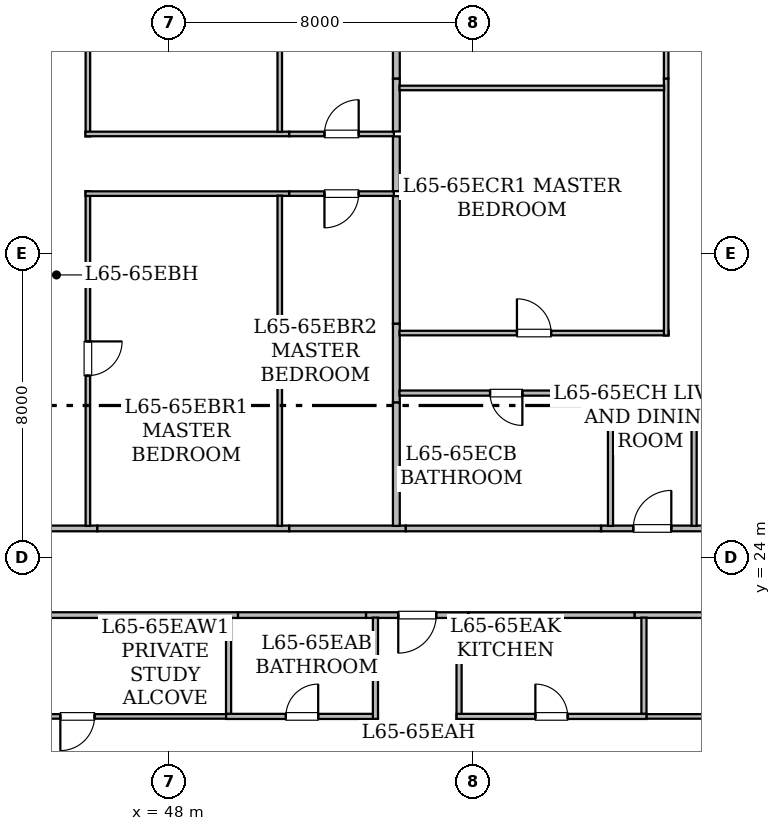
"""IFC4 building model, lengths in metres.
Left out: names, types, materials, properties, quantities, classifications, styles, units other than length and angle.
Written with IfcOpenShell. Run it as: python <this file> out.ifc"""

import sys

from ifc_helpers import new_model, si_unit, direction, frame, frame_2d, origin, place, context, subcontext, project, spatial, rectangle, extrude, element, fill, save


model = new_model("IFC4")
c1 = context("Model", 3, precision=1e-05, world=origin(), true_north=direction((0.0, 1.0)))
c2 = subcontext(c1, "Body", "Model", "MODEL_VIEW")
j1 = project(units=[si_unit("LENGTHUNIT", "METRE"), si_unit("PLANEANGLEUNIT", "RADIAN")], contexts=[c1])
p1 = place(None, origin())
s1 = spatial("IfcSite", under=j1, at=p1, CompositionType="ELEMENT")
p2 = place(p1, origin())
s2 = spatial("IfcBuilding", under=s1, at=p2, CompositionType="ELEMENT")
p3 = place(p2, frame((0.0, 0.0, 253.7)))
s3 = spatial("IfcBuildingStorey", under=s2, at=p3, CompositionType="ELEMENT", Elevation=253.7)
p4 = place(p3, frame((49.819, 22.485, 0.0), z_axis=(0.0, 0.0, 1.0), x_axis=(-1.0, 0.0, 0.0)))
e1 = element("IfcWall", 1, at=p4, inside=s3, PredefinedType="STANDARD", context=c2, shape_type="SweptSolid", body=[
    extrude(rectangle(XDim=8.269, YDim=0.15, at=frame_2d((4.135, 0.0))), origin(), (0.0, 0.0, 1.0), 3.43),
])
p5 = place(p3, frame((69.608, 22.485, 0.0), z_axis=(0.0, 0.0, 1.0), x_axis=(-1.0, 0.0, 0.0)))
e2 = element("IfcWall", 2, at=p5, inside=s3, PredefinedType="STANDARD", context=c2, shape_type="SweptSolid", body=[
    extrude(rectangle(XDim=9.357, YDim=0.15, at=frame_2d((4.678, 0.0))), origin(), (0.0, 0.0, 1.0), 2.887),
])
p6 = place(p3, frame((55.884, 22.485, 0.0), z_axis=(0.0, 0.0, 1.0), x_axis=(-1.0, 0.0, 0.0)))
e3 = element("IfcWall", 3, at=p6, inside=s3, PredefinedType="STANDARD", context=c2, shape_type="SweptSolid", body=[
    extrude(rectangle(XDim=2.698, YDim=0.15, at=frame_2d((1.349, 0.0))), origin(), (0.0, 0.0, 1.0), 2.725),
])
p7 = place(p6, frame((0.849, 0.0, 0.0)))
e4 = element("IfcOpeningElement", 4, at=p7, cuts=e3, PredefinedType="OPENING", context=c2, shape_type="SweptSolid", body=[
    extrude(rectangle(XDim=1.0, YDim=2.15, at=frame_2d((0.5, 1.075))), frame((0.0, 0.085, 0.0), z_axis=(0.0, -1.0, 0.0), x_axis=(1.0, 0.0, 0.0)), (0.0, 0.0, 1.0), 0.17),
])
p8 = place(p3, frame((53.186, 22.485, 0.0), z_axis=(0.0, 0.0, 1.0), x_axis=(-1.0, 0.0, 0.0)))
e5 = element("IfcWall", 5, at=p8, inside=s3, PredefinedType="STANDARD", context=c2, shape_type="SweptSolid", body=[
    extrude(rectangle(XDim=3.367, YDim=0.15, at=frame_2d((1.684, 0.0))), origin(), (0.0, 0.0, 1.0), 2.725),
])
p9 = place(p3, frame((60.251, 22.485, 0.0), z_axis=(0.0, 0.0, 1.0), x_axis=(-1.0, 0.0, 0.0)))
e6 = element("IfcWall", 6, at=p9, inside=s3, PredefinedType="STANDARD", context=c2, shape_type="SweptSolid", body=[
    extrude(rectangle(XDim=4.367, YDim=0.15, at=frame_2d((2.184, 0.0))), origin(), (0.0, 0.0, 1.0), 3.43),
])
p10 = place(p3, frame((44.039, 24.765, 0.0), z_axis=(0.0, 0.0, 1.0), x_axis=(1.0, 0.0, 0.0)))
e7 = element("IfcWall", 7, at=p10, inside=s3, PredefinedType="STANDARD", context=c2, shape_type="SweptSolid", body=[
    extrude(rectangle(XDim=2.078, YDim=0.15, at=frame_2d((1.039, 0.0))), origin(), (0.0, 0.0, 1.0), 3.43),
])
p11 = place(p3, frame((46.117, 24.765, 0.0), z_axis=(0.0, 0.0, 1.0), x_axis=(1.0, 0.0, 0.0)))
e8 = element("IfcWall", 8, at=p11, inside=s3, PredefinedType="STANDARD", context=c2, shape_type="SweptSolid", body=[
    extrude(rectangle(XDim=5.05, YDim=0.15, at=frame_2d((2.525, 0.0))), origin(), (0.0, 0.0, 1.0), 3.43),
])
p12 = place(p3, frame((51.167, 24.765, 0.0), z_axis=(0.0, 0.0, 1.0), x_axis=(1.0, 0.0, 0.0)))
e9 = element("IfcWall", 9, at=p12, inside=s3, PredefinedType="STANDARD", context=c2, shape_type="SweptSolid", body=[
    extrude(rectangle(XDim=3.067, YDim=0.15, at=frame_2d((1.533, 0.0))), origin(), (0.0, 0.0, 1.0), 2.725),
])
p13 = place(p3, frame((59.371, 24.765, 0.0), z_axis=(0.0, 0.0, 1.0), x_axis=(1.0, 0.0, 0.0)))
e10 = element("IfcWall", 10, at=p13, inside=s3, PredefinedType="STANDARD", context=c2, shape_type="SweptSolid", body=[
    extrude(rectangle(XDim=2.698, YDim=0.15, at=frame_2d((1.349, 0.0))), origin(), (0.0, 0.0, 1.0), 3.43),
])
p14 = place(p13, frame((0.849, 0.0, 0.0)))
e11 = element("IfcOpeningElement", 11, at=p14, cuts=e10, PredefinedType="OPENING", context=c2, shape_type="SweptSolid", body=[
    extrude(rectangle(XDim=1.0, YDim=2.15, at=frame_2d((0.5, 1.075))), frame((0.0, 0.085, 0.0), z_axis=(0.0, -1.0, 0.0), x_axis=(1.0, 0.0, 0.0)), (0.0, 0.0, 1.0), 0.17),
])
p15 = place(p3, frame((54.234, 24.765, 0.0), z_axis=(0.0, 0.0, 1.0), x_axis=(1.0, 0.0, 0.0)))
e12 = element("IfcWall", 12, at=p15, inside=s3, PredefinedType="STANDARD", context=c2, shape_type="SweptSolid", body=[
    extrude(rectangle(XDim=5.137, YDim=0.15, at=frame_2d((2.569, 0.0))), origin(), (0.0, 0.0, 1.0), 3.43),
])
p16 = place(p3, frame((49.505, 19.819, 0.0), z_axis=(0.0, 0.0, 1.0), x_axis=(-1.0, 0.0, 0.0)))
e13 = element("IfcWall", 13, at=p16, inside=s3, PredefinedType="PARTITIONING", context=c2, shape_type="SweptSolid", body=[
    extrude(rectangle(XDim=7.823, YDim=0.12, at=frame_2d((3.912, 0.0))), origin(), (0.0, 0.0, 1.0), 3.43),
])
p17 = place(p16, frame((3.462, 0.0, 0.0)))
e14 = element("IfcOpeningElement", 14, at=p17, cuts=e13, PredefinedType="OPENING", context=c2, shape_type="SweptSolid", body=[
    extrude(rectangle(XDim=0.9, YDim=2.1, at=frame_2d((0.45, 1.05))), frame((0.0, 0.07, 0.0), z_axis=(0.0, -1.0, 0.0), x_axis=(1.0, 0.0, 0.0)), (0.0, 0.0, 1.0), 0.14),
])
p18 = place(p3, frame((49.57, 22.418, 0.0), z_axis=(0.0, 0.0, 1.0), x_axis=(0.0, -1.0, 0.0)))
e15 = element("IfcWall", 15, at=p18, inside=s3, PredefinedType="PARTITIONING", context=c2, shape_type="SweptSolid", body=[
    extrude(rectangle(XDim=2.534, YDim=0.135, at=frame_2d((1.267, 0.0))), origin(), (0.0, 0.0, 1.0), 3.43),
])
p19 = place(p3, frame((69.608, 19.819, 0.0), z_axis=(0.0, 0.0, 1.0), x_axis=(-1.0, 0.0, 0.0)))
e16 = element("IfcWall", 16, at=p19, inside=s3, PredefinedType="PARTITIONING", context=c2, shape_type="SweptSolid", body=[
    extrude(rectangle(XDim=9.043, YDim=0.12, at=frame_2d((4.521, 0.0))), origin(), (0.0, 0.0, 1.0), 2.725),
])
p20 = place(p19, frame((4.071, 0.0, 0.0)))
e17 = element("IfcOpeningElement", 17, at=p20, cuts=e16, PredefinedType="OPENING", context=c2, shape_type="SweptSolid", body=[
    extrude(rectangle(XDim=0.9, YDim=2.1, at=frame_2d((0.45, 1.05))), frame((0.0, 0.07, 0.0), z_axis=(0.0, -1.0, 0.0), x_axis=(1.0, 0.0, 0.0)), (0.0, 0.0, 1.0), 0.14),
])
p21 = place(p3, frame((60.5, 19.884, 0.0), z_axis=(0.0, 0.0, 1.0), x_axis=(0.0, 1.0, 0.0)))
e18 = element("IfcWall", 18, at=p21, inside=s3, PredefinedType="PARTITIONING", context=c2, shape_type="SweptSolid", body=[
    extrude(rectangle(XDim=2.534, YDim=0.135, at=frame_2d((1.267, 0.0))), origin(), (0.0, 0.0, 1.0), 3.43),
])
p22 = place(p3, frame((49.505, 19.819, 0.0), z_axis=(0.0, 0.0, 1.0), x_axis=(1.0, 0.0, 0.0)))
e19 = element("IfcWall", 19, at=p22, inside=s3, PredefinedType="PARTITIONING", context=c2, shape_type="SweptSolid", body=[
    extrude(rectangle(XDim=3.995, YDim=0.135, at=frame_2d((1.998, 0.0))), origin(), (0.0, 0.0, 1.0), 2.725),
])
p23 = place(p22, frame((1.573, 0.0, 0.0)))
e20 = element("IfcOpeningElement", 20, at=p23, cuts=e19, PredefinedType="OPENING", context=c2, shape_type="SweptSolid", body=[
    extrude(rectangle(XDim=0.85, YDim=2.1, at=frame_2d((0.425, 1.05))), frame((0.0, 0.077, 0.0), z_axis=(0.0, -1.0, 0.0), x_axis=(1.0, 0.0, 0.0)), (0.0, 0.0, 1.0), 0.155),
])
p24 = place(p3, frame((53.435, 19.754, 0.0), z_axis=(0.0, 0.0, 1.0), x_axis=(0.0, 1.0, 0.0)))
e21 = element("IfcWall", 21, at=p24, inside=s3, PredefinedType="PARTITIONING", context=c2, shape_type="SweptSolid", body=[
    extrude(rectangle(XDim=2.664, YDim=0.135, at=frame_2d((1.332, 0.0))), origin(), (0.0, 0.0, 1.0), 2.725),
])
p25 = place(p3, frame((55.635, 22.418, 0.0), z_axis=(0.0, 0.0, 1.0), x_axis=(0.0, -1.0, 0.0)))
e22 = element("IfcWall", 22, at=p25, inside=s3, PredefinedType="PARTITIONING", context=c2, shape_type="SweptSolid", body=[
    extrude(rectangle(XDim=2.664, YDim=0.135, at=frame_2d((1.332, 0.0))), origin(), (0.0, 0.0, 1.0), 3.43),
])
p26 = place(p3, frame((55.57, 19.819, 0.0), z_axis=(0.0, 0.0, 1.0), x_axis=(1.0, 0.0, 0.0)))
e23 = element("IfcWall", 23, at=p26, inside=s3, PredefinedType="PARTITIONING", context=c2, shape_type="SweptSolid", body=[
    extrude(rectangle(XDim=4.995, YDim=0.135, at=frame_2d((2.498, 0.0))), origin(), (0.0, 0.0, 1.0), 2.725),
])
p27 = place(p26, frame((2.073, 0.0, 0.0)))
e24 = element("IfcOpeningElement", 24, at=p27, cuts=e23, PredefinedType="OPENING", context=c2, shape_type="SweptSolid", body=[
    extrude(rectangle(XDim=0.85, YDim=2.1, at=frame_2d((0.425, 1.05))), frame((0.0, 0.077, 0.0), z_axis=(0.0, -1.0, 0.0), x_axis=(1.0, 0.0, 0.0)), (0.0, 0.0, 1.0), 0.155),
])
p28 = place(p3, frame((45.868, 33.64, 0.0), z_axis=(0.0, 0.0, 1.0), x_axis=(0.0, -1.0, 0.0)))
e25 = element("IfcWall", 25, at=p28, inside=s3, PredefinedType="PARTITIONING", context=c2, shape_type="SweptSolid", body=[
    extrude(rectangle(XDim=8.808, YDim=0.12, at=frame_2d((4.404, 0.0))), origin(), (0.0, 0.0, 1.0), 3.013),
])
p29 = place(p28, frame((3.954, 0.0, 0.0)))
e26 = element("IfcOpeningElement", 26, at=p29, cuts=e25, PredefinedType="OPENING", context=c2, shape_type="SweptSolid", body=[
    extrude(rectangle(XDim=0.9, YDim=2.1, at=frame_2d((0.45, 1.05))), frame((0.0, 0.07, 0.0), z_axis=(0.0, -1.0, 0.0), x_axis=(1.0, 0.0, 0.0)), (0.0, 0.0, 1.0), 0.14),
])
p30 = place(p3, frame((51.167, 33.575, 0.0), z_axis=(0.0, 0.0, 1.0), x_axis=(-1.0, 0.0, 0.0)))
e27 = element("IfcWall", 27, at=p30, inside=s3, PredefinedType="PARTITIONING", context=c2, shape_type="SweptSolid", body=[
    extrude(rectangle(XDim=5.364, YDim=0.12, at=frame_2d((2.682, 0.0))), origin(), (0.0, 0.0, 1.0), 3.013),
])
p31 = place(p3, frame((53.92, 33.575, 0.0), z_axis=(0.0, 0.0, 1.0), x_axis=(-1.0, 0.0, 0.0)))
e28 = element("IfcWall", 28, at=p31, inside=s3, PredefinedType="PARTITIONING", context=c2, shape_type="SweptSolid", body=[
    extrude(rectangle(XDim=2.753, YDim=0.12, at=frame_2d((1.376, 0.0))), origin(), (0.0, 0.0, 1.0), 2.725),
])
p32 = place(p31, frame((0.927, 0.0, 0.0)))
e29 = element("IfcOpeningElement", 29, at=p32, cuts=e28, PredefinedType="OPENING", context=c2, shape_type="SweptSolid", body=[
    extrude(rectangle(XDim=0.9, YDim=2.1, at=frame_2d((0.45, 1.05))), frame((0.0, 0.07, 0.0), z_axis=(0.0, -1.0, 0.0), x_axis=(1.0, 0.0, 0.0)), (0.0, 0.0, 1.0), 0.14),
])
p33 = place(p3, frame((45.868, 43.808, 0.0), z_axis=(0.0, 0.0, 1.0), x_axis=(0.0, -1.0, 0.0)))
e30 = element("IfcWall", 30, at=p33, inside=s3, PredefinedType="PARTITIONING", context=c2, shape_type="SweptSolid", body=[
    extrude(rectangle(XDim=8.728, YDim=0.12, at=frame_2d((4.364, 0.0))), origin(), (0.0, 0.0, 1.0), 2.725),
])
p34 = place(p33, frame((3.914, 0.0, 0.0)))
e31 = element("IfcOpeningElement", 31, at=p34, cuts=e30, PredefinedType="OPENING", context=c2, shape_type="SweptSolid", body=[
    extrude(rectangle(XDim=0.9, YDim=2.1, at=frame_2d((0.45, 1.05))), frame((0.0, 0.07, 0.0), z_axis=(0.0, -1.0, 0.0), x_axis=(1.0, 0.0, 0.0)), (0.0, 0.0, 1.0), 0.14),
])
p35 = place(p3, frame((45.803, 35.145, 0.0), z_axis=(0.0, 0.0, 1.0), x_axis=(1.0, 0.0, 0.0)))
e32 = element("IfcWall", 32, at=p35, inside=s3, PredefinedType="PARTITIONING", context=c2, shape_type="SweptSolid", body=[
    extrude(rectangle(XDim=5.364, YDim=0.12, at=frame_2d((2.682, 0.0))), origin(), (0.0, 0.0, 1.0), 3.43),
])
p36 = place(p3, frame((51.167, 35.145, 0.0), z_axis=(0.0, 0.0, 1.0), x_axis=(1.0, 0.0, 0.0)))
e33 = element("IfcWall", 33, at=p36, inside=s3, PredefinedType="PARTITIONING", context=c2, shape_type="SweptSolid", body=[
    extrude(rectangle(XDim=2.753, YDim=0.12, at=frame_2d((1.376, 0.0))), origin(), (0.0, 0.0, 1.0), 2.725),
])
p37 = place(p36, frame((0.927, 0.0, 0.0)))
e34 = element("IfcOpeningElement", 34, at=p37, cuts=e33, PredefinedType="OPENING", context=c2, shape_type="SweptSolid", body=[
    extrude(rectangle(XDim=0.9, YDim=2.1, at=frame_2d((0.45, 1.05))), frame((0.0, 0.07, 0.0), z_axis=(0.0, -1.0, 0.0), x_axis=(1.0, 0.0, 0.0)), (0.0, 0.0, 1.0), 0.14),
])
p38 = place(p3, frame((53.985, 35.08, 0.0), z_axis=(0.0, 0.0, 1.0), x_axis=(0.0, -1.0, 0.0)))
e35 = element("IfcWall", 35, at=p38, inside=s3, PredefinedType="STANDARD", context=c2, shape_type="SweptSolid", body=[
    extrude(rectangle(XDim=1.44, YDim=0.18, at=frame_2d((0.72, 0.0))), origin(), (0.0, 0.0, 1.0), 3.43),
])
p39 = place(p3, frame((50.917, 33.521, 0.0), z_axis=(0.0, 0.0, 1.0), x_axis=(0.0, -1.0, 0.0)))
e36 = element("IfcWall", 36, at=p39, inside=s3, PredefinedType="PARTITIONING", context=c2, shape_type="SweptSolid", body=[
    extrude(rectangle(XDim=8.689, YDim=0.12, at=frame_2d((4.344, 0.0))), origin(), (0.0, 0.0, 1.0), 3.013),
])
p40 = place(p3, frame((53.985, 30.155, 0.0), z_axis=(0.0, 0.0, 1.0), x_axis=(0.0, -1.0, 0.0)))
e37 = element("IfcWall", 37, at=p40, inside=s3, PredefinedType="STANDARD", context=c2, shape_type="SweptSolid", body=[
    extrude(rectangle(XDim=2.078, YDim=0.18, at=frame_2d((1.039, 0.0))), origin(), (0.0, 0.0, 1.0), 3.43),
])
p41 = place(p3, frame((53.985, 28.077, 0.0), z_axis=(0.0, 0.0, 1.0), x_axis=(0.0, -1.0, 0.0)))
e38 = element("IfcWall", 38, at=p41, inside=s3, PredefinedType="STANDARD", context=c2, shape_type="SweptSolid", body=[
    extrude(rectangle(XDim=3.245, YDim=0.18, at=frame_2d((1.623, 0.0))), origin(), (0.0, 0.0, 1.0), 3.43),
])
p42 = place(p3, frame((53.985, 33.51, 0.0), z_axis=(0.0, 0.0, 1.0), x_axis=(0.0, -1.0, 0.0)))
e39 = element("IfcWall", 39, at=p42, inside=s3, PredefinedType="STANDARD", context=c2, shape_type="SweptSolid", body=[
    extrude(rectangle(XDim=3.355, YDim=0.18, at=frame_2d((1.677, 0.0))), origin(), (0.0, 0.0, 1.0), 3.013),
])
p43 = place(p3, frame((50.917, 43.808, 0.0), z_axis=(0.0, 0.0, 1.0), x_axis=(0.0, -1.0, 0.0)))
e40 = element("IfcWall", 40, at=p43, inside=s3, PredefinedType="PARTITIONING", context=c2, shape_type="SweptSolid", body=[
    extrude(rectangle(XDim=8.609, YDim=0.12, at=frame_2d((4.305, 0.0))), origin(), (0.0, 0.0, 1.0), 2.725),
])
p44 = place(p3, frame((53.985, 36.604, 0.0), z_axis=(0.0, 0.0, 1.0), x_axis=(0.0, -1.0, 0.0)))
e41 = element("IfcWall", 41, at=p44, inside=s3, PredefinedType="STANDARD", context=c2, shape_type="SweptSolid", body=[
    extrude(rectangle(XDim=1.394, YDim=0.18, at=frame_2d((0.697, 0.0))), origin(), (0.0, 0.0, 1.0), 3.43),
])
p45 = place(p3, frame((53.985, 43.808, 0.0), z_axis=(0.0, 0.0, 1.0), x_axis=(0.0, -1.0, 0.0)))
e42 = element("IfcWall", 42, at=p45, inside=s3, PredefinedType="STANDARD", context=c2, shape_type="SweptSolid", body=[
    extrude(rectangle(XDim=7.204, YDim=0.18, at=frame_2d((3.602, 0.0))), origin(), (0.0, 0.0, 1.0), 2.725),
])
p46 = place(p3, frame((59.62, 24.832, 0.0), z_axis=(0.0, 0.0, 1.0), x_axis=(0.0, 1.0, 0.0)))
e43 = element("IfcWall", 43, at=p46, inside=s3, PredefinedType="PARTITIONING", context=c2, shape_type="SweptSolid", body=[
    extrude(rectangle(XDim=3.559, YDim=0.135, at=frame_2d((1.78, 0.0))), origin(), (0.0, 0.0, 1.0), 3.43),
])
p47 = place(p3, frame((59.685, 28.326, 0.0), z_axis=(0.0, 0.0, 1.0), x_axis=(-1.0, 0.0, 0.0)))
e44 = element("IfcWall", 44, at=p47, inside=s3, PredefinedType="PARTITIONING", context=c2, shape_type="SweptSolid", body=[
    extrude(rectangle(XDim=5.618, YDim=0.135, at=frame_2d((2.809, 0.0))), origin(), (0.0, 0.0, 1.0), 3.43),
])
p48 = place(p47, frame((2.384, 0.0, 0.0)))
e45 = element("IfcOpeningElement", 45, at=p48, cuts=e44, PredefinedType="OPENING", context=c2, shape_type="SweptSolid", body=[
    extrude(rectangle(XDim=0.85, YDim=2.1, at=frame_2d((0.425, 1.05))), frame((0.0, 0.077, 0.0), z_axis=(0.0, -1.0, 0.0), x_axis=(1.0, 0.0, 0.0)), (0.0, 0.0, 1.0), 0.155),
])
p49 = place(p3, frame((67.686, 28.326, 0.0), z_axis=(0.0, 0.0, 1.0), x_axis=(-1.0, 0.0, 0.0)))
e46 = element("IfcWall", 46, at=p49, inside=s3, PredefinedType="PARTITIONING", context=c2, shape_type="SweptSolid", body=[
    extrude(rectangle(XDim=5.931, YDim=0.135, at=frame_2d((2.966, 0.0))), origin(), (0.0, 0.0, 1.0), 2.887),
])
p50 = place(p49, frame((2.541, 0.0, 0.0)))
e47 = element("IfcOpeningElement", 47, at=p50, cuts=e46, PredefinedType="OPENING", context=c2, shape_type="SweptSolid", body=[
    extrude(rectangle(XDim=0.85, YDim=2.1, at=frame_2d((0.425, 1.05))), frame((0.0, 0.077, 0.0), z_axis=(0.0, -1.0, 0.0), x_axis=(1.0, 0.0, 0.0)), (0.0, 0.0, 1.0), 0.155),
])
p51 = place(p3, frame((61.82, 28.391, 0.0), z_axis=(0.0, 0.0, 1.0), x_axis=(0.0, -1.0, 0.0)))
e48 = element("IfcWall", 48, at=p51, inside=s3, PredefinedType="PARTITIONING", context=c2, shape_type="SweptSolid", body=[
    extrude(rectangle(XDim=3.559, YDim=0.135, at=frame_2d((1.78, 0.0))), origin(), (0.0, 0.0, 1.0), 3.43),
])
p52 = place(p3, frame((54.067, 29.906, 0.0), z_axis=(0.0, 0.0, 1.0), x_axis=(1.0, 0.0, 0.0)))
e49 = element("IfcWall", 49, at=p52, inside=s3, PredefinedType="PARTITIONING", context=c2, shape_type="SweptSolid", body=[
    extrude(rectangle(XDim=7.083, YDim=0.12, at=frame_2d((3.542, 0.0))), origin(), (0.0, 0.0, 1.0), 3.43),
])
p53 = place(p52, frame((3.091, 0.0, 0.0)))
e50 = element("IfcOpeningElement", 50, at=p53, cuts=e49, PredefinedType="OPENING", context=c2, shape_type="SweptSolid", body=[
    extrude(rectangle(XDim=0.9, YDim=2.1, at=frame_2d((0.45, 1.05))), frame((0.0, 0.07, 0.0), z_axis=(0.0, -1.0, 0.0), x_axis=(1.0, 0.0, 0.0)), (0.0, 0.0, 1.0), 0.14),
])
p54 = place(p3, frame((61.085, 29.841, 0.0), z_axis=(0.0, 0.0, 1.0), x_axis=(0.0, 1.0, 0.0)))
e51 = element("IfcWall", 51, at=p54, inside=s3, PredefinedType="PARTITIONING", context=c2, shape_type="SweptSolid", body=[
    extrude(rectangle(XDim=6.763, YDim=0.12, at=frame_2d((3.381, 0.0))), origin(), (0.0, 0.0, 1.0), 2.725),
])
p55 = place(p3, frame((61.085, 36.604, 0.0), z_axis=(0.0, 0.0, 1.0), x_axis=(0.0, 1.0, 0.0)))
e52 = element("IfcWall", 52, at=p55, inside=s3, PredefinedType="PARTITIONING", context=c2, shape_type="SweptSolid", body=[
    extrude(rectangle(XDim=7.204, YDim=0.12, at=frame_2d((3.602, 0.0))), origin(), (0.0, 0.0, 1.0), 2.725),
])
p56 = place(p55, frame((3.152, 0.0, 0.0)))
e53 = element("IfcOpeningElement", 53, at=p56, cuts=e52, PredefinedType="OPENING", context=c2, shape_type="SweptSolid", body=[
    extrude(rectangle(XDim=0.9, YDim=2.1, at=frame_2d((0.45, 1.05))), frame((0.0, 0.07, 0.0), z_axis=(0.0, -1.0, 0.0), x_axis=(1.0, 0.0, 0.0)), (0.0, 0.0, 1.0), 0.14),
])
p57 = place(p3, frame((54.067, 36.355, 0.0), z_axis=(0.0, 0.0, 1.0), x_axis=(1.0, 0.0, 0.0)))
e54 = element("IfcWall", 54, at=p57, inside=s3, PredefinedType="PARTITIONING", context=c2, shape_type="SweptSolid", body=[
    extrude(rectangle(XDim=6.964, YDim=0.12, at=frame_2d((3.482, 0.0))), origin(), (0.0, 0.0, 1.0), 2.725),
])
p58 = place(p7, origin())
e55 = element("IfcDoor", 55, at=p58, inside=s3, OperationType="SINGLE_SWING_RIGHT", PredefinedType="DOOR", context=c2, shape_type="SweptSolid", body=[
    extrude(rectangle(XDim=1.0, YDim=2.15, at=frame_2d((0.5, 1.075))), frame((0.0, 0.025, 0.0), z_axis=(0.0, -1.0, 0.0), x_axis=(1.0, 0.0, 0.0)), (0.0, 0.0, 1.0), 0.05),
])
fill(e4, e55)
p59 = place(p14, origin())
e56 = element("IfcDoor", 56, at=p59, inside=s3, OperationType="SINGLE_SWING_RIGHT", PredefinedType="DOOR", context=c2, shape_type="SweptSolid", body=[
    extrude(rectangle(XDim=1.0, YDim=2.15, at=frame_2d((0.5, 1.075))), frame((0.0, 0.025, 0.0), z_axis=(0.0, -1.0, 0.0), x_axis=(1.0, 0.0, 0.0)), (0.0, 0.0, 1.0), 0.05),
])
fill(e11, e56)
p60 = place(p17, origin())
e57 = element("IfcDoor", 57, at=p60, inside=s3, OperationType="SINGLE_SWING_RIGHT", PredefinedType="DOOR", context=c2, shape_type="SweptSolid", body=[
    extrude(rectangle(XDim=0.9, YDim=2.1, at=frame_2d((0.45, 1.05))), frame((0.0, 0.025, 0.0), z_axis=(0.0, -1.0, 0.0), x_axis=(1.0, 0.0, 0.0)), (0.0, 0.0, 1.0), 0.05),
])
fill(e14, e57)
p61 = place(p23, origin())
e58 = element("IfcDoor", 58, at=p61, inside=s3, OperationType="SINGLE_SWING_RIGHT", PredefinedType="DOOR", context=c2, shape_type="SweptSolid", body=[
    extrude(rectangle(XDim=0.85, YDim=2.1, at=frame_2d((0.425, 1.05))), frame((0.0, 0.025, 0.0), z_axis=(0.0, -1.0, 0.0), x_axis=(1.0, 0.0, 0.0)), (0.0, 0.0, 1.0), 0.05),
])
fill(e20, e58)
p62 = place(p27, origin())
e59 = element("IfcDoor", 59, at=p62, inside=s3, OperationType="SINGLE_SWING_LEFT", PredefinedType="DOOR", context=c2, shape_type="SweptSolid", body=[
    extrude(rectangle(XDim=0.85, YDim=2.1, at=frame_2d((0.425, 1.05))), frame((0.0, 0.025, 0.0), z_axis=(0.0, -1.0, 0.0), x_axis=(1.0, 0.0, 0.0)), (0.0, 0.0, 1.0), 0.05),
])
fill(e24, e59)
p63 = place(p29, origin())
e60 = element("IfcDoor", 60, at=p63, inside=s3, OperationType="SINGLE_SWING_LEFT", PredefinedType="DOOR", context=c2, shape_type="SweptSolid", body=[
    extrude(rectangle(XDim=0.9, YDim=2.1, at=frame_2d((0.45, 1.05))), frame((0.0, 0.025, 0.0), z_axis=(0.0, -1.0, 0.0), x_axis=(1.0, 0.0, 0.0)), (0.0, 0.0, 1.0), 0.05),
])
fill(e26, e60)
p64 = place(p32, origin())
e61 = element("IfcDoor", 61, at=p64, inside=s3, OperationType="SINGLE_SWING_RIGHT", PredefinedType="DOOR", context=c2, shape_type="SweptSolid", body=[
    extrude(rectangle(XDim=0.9, YDim=2.1, at=frame_2d((0.45, 1.05))), frame((0.0, 0.025, 0.0), z_axis=(0.0, -1.0, 0.0), x_axis=(1.0, 0.0, 0.0)), (0.0, 0.0, 1.0), 0.05),
])
fill(e29, e61)
p65 = place(p37, origin())
e62 = element("IfcDoor", 62, at=p65, inside=s3, OperationType="SINGLE_SWING_RIGHT", PredefinedType="DOOR", context=c2, shape_type="SweptSolid", body=[
    extrude(rectangle(XDim=0.9, YDim=2.1, at=frame_2d((0.45, 1.05))), frame((0.0, 0.025, 0.0), z_axis=(0.0, -1.0, 0.0), x_axis=(1.0, 0.0, 0.0)), (0.0, 0.0, 1.0), 0.05),
])
fill(e34, e62)
p66 = place(p48, origin())
e63 = element("IfcDoor", 63, at=p66, inside=s3, OperationType="SINGLE_SWING_LEFT", PredefinedType="DOOR", context=c2, shape_type="SweptSolid", body=[
    extrude(rectangle(XDim=0.85, YDim=2.1, at=frame_2d((0.425, 1.05))), frame((0.0, 0.025, 0.0), z_axis=(0.0, -1.0, 0.0), x_axis=(1.0, 0.0, 0.0)), (0.0, 0.0, 1.0), 0.05),
])
fill(e45, e63)
p67 = place(p53, origin())
e64 = element("IfcDoor", 64, at=p67, inside=s3, OperationType="SINGLE_SWING_LEFT", PredefinedType="DOOR", context=c2, shape_type="SweptSolid", body=[
    extrude(rectangle(XDim=0.9, YDim=2.1, at=frame_2d((0.45, 1.05))), frame((0.0, 0.025, 0.0), z_axis=(0.0, -1.0, 0.0), x_axis=(1.0, 0.0, 0.0)), (0.0, 0.0, 1.0), 0.05),
])
fill(e50, e64)
save(model, sys.argv[1])
